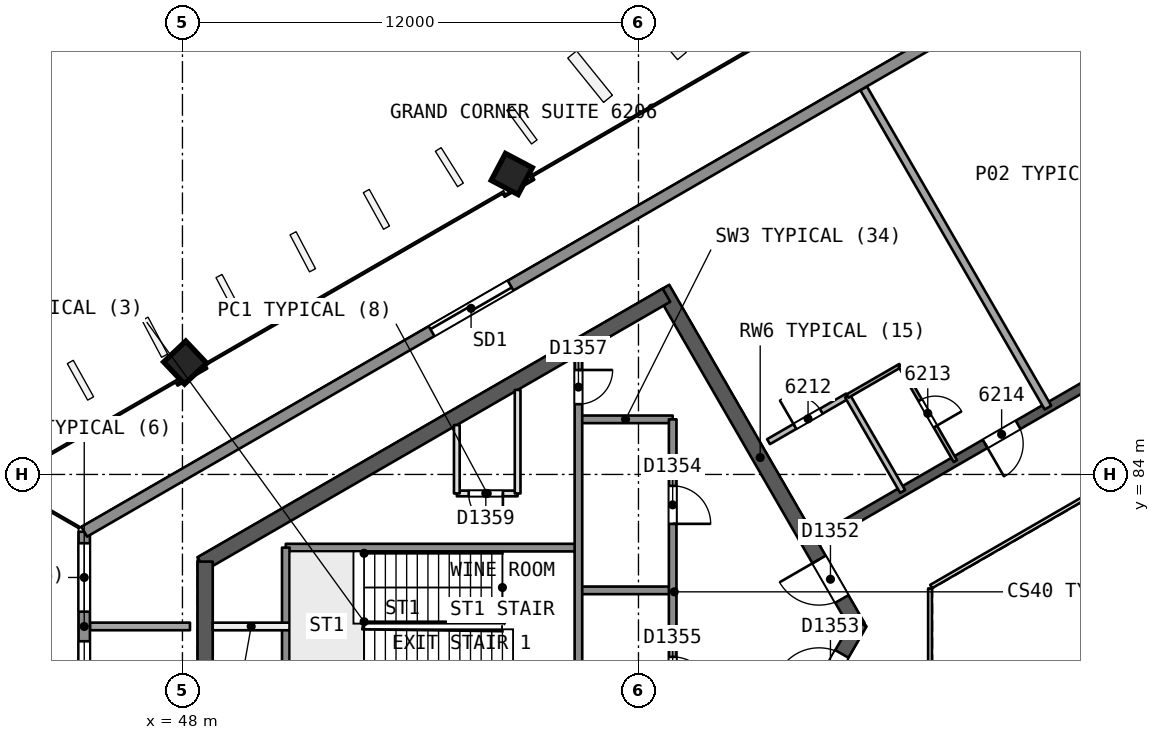
"""IFC4 building model, lengths in metres.
Left out: names, types, materials, properties, quantities, classifications, styles, units other than length and angle.
Written with IfcOpenShell. Run it as: python <this file> out.ifc"""

import sys

from ifc_helpers import new_model, si_unit, direction, frame, frame_2d, origin, origin_2d, place, context, subcontext, project, spatial, rectangle, extrude, element, fill, save


model = new_model("IFC4")
c1 = context("Model", 3, precision=1e-05, world=origin(), true_north=direction((0.0, 1.0)))
c2 = subcontext(c1, "Body", "Model", "MODEL_VIEW")
j1 = project(units=[si_unit("LENGTHUNIT", "METRE"), si_unit("PLANEANGLEUNIT", "RADIAN")], contexts=[c1])
p1 = place(None, origin())
s1 = spatial("IfcSite", under=j1, at=p1, CompositionType="ELEMENT")
p2 = place(p1, origin())
s2 = spatial("IfcBuilding", under=s1, at=p2, CompositionType="ELEMENT")
p3 = place(p2, frame((0.0, 0.0, 255.3)))
s3 = spatial("IfcBuildingStorey", under=s2, at=p3, CompositionType="ELEMENT", Elevation=255.3)
p4 = place(p3, frame((65.769, 80.0, 0.0), z_axis=(0.0, 0.0, 1.0), x_axis=(-0.50000177223, 0.866024380585, 0.0)))
e1 = element("IfcWall", 1, at=p4, inside=s3, PredefinedType="SHEAR", context=c2, shape_type="SweptSolid", body=[
    extrude(rectangle(XDim=10.265, YDim=0.4, at=frame_2d((5.132, 0.0))), origin(), (0.0, 0.0, 1.0), 3.7),
])
p5 = place(p4, frame((0.834, 0.0, 0.0)))
e2 = element("IfcOpeningElement", 2, at=p5, cuts=e1, PredefinedType="OPENING", context=c2, shape_type="SweptSolid", body=[
    extrude(rectangle(XDim=1.2, YDim=2.1, at=frame_2d((0.6, 1.05))), frame((0.0, 0.21, 0.0), z_axis=(0.0, -1.0, 0.0), x_axis=(1.0, 0.0, 0.0)), (0.0, 0.0, 1.0), 0.421),
])
p6 = place(p3, frame((60.737, 88.716, 0.0), z_axis=(0.0, 0.0, 1.0), x_axis=(-0.866028812667, -0.499994095595, 0.0)))
e3 = element("IfcWall", 3, at=p6, inside=s3, PredefinedType="SHEAR", context=c2, shape_type="SweptSolid", body=[
    extrude(rectangle(XDim=14.134, YDim=0.4, at=frame_2d((7.067, 0.0))), origin(), (0.0, 0.0, 1.0), 3.7),
])
p7 = place(p3, frame((48.597, 81.707, 0.0), z_axis=(0.0, 0.0, 1.0), x_axis=(0.0, -1.0, 0.0)))
e4 = element("IfcWall", 4, at=p7, inside=s3, PredefinedType="SHEAR", context=c2, shape_type="SweptSolid", body=[
    extrude(rectangle(XDim=3.53, YDim=0.4, at=frame_2d((1.765, 0.0))), origin(), (0.0, 0.0, 1.0), 3.7),
])
p8 = place(p3, frame((60.737, 71.284, 0.0), z_axis=(0.0, 0.0, 1.0), x_axis=(0.50000547566, 0.866022242388, 0.0)))
e5 = element("IfcWall", 5, at=p8, inside=s3, PredefinedType="SHEAR", context=c2, shape_type="SweptSolid", body=[
    extrude(rectangle(XDim=10.18, YDim=0.4, at=frame_2d((5.09, 0.0))), origin(), (0.0, 0.0, 1.0), 3.7),
])
p9 = place(p8, frame((8.03, 0.0, 0.0)))
e6 = element("IfcOpeningElement", 6, at=p9, cuts=e5, PredefinedType="OPENING", context=c2, shape_type="SweptSolid", body=[
    extrude(rectangle(XDim=1.2, YDim=2.1, at=frame_2d((0.6, 1.05))), frame((0.0, 0.21, 0.0), z_axis=(0.0, -1.0, 0.0), x_axis=(1.0, 0.0, 0.0)), (0.0, 0.0, 1.0), 0.421),
])
p10 = place(p3, frame((78.2, 90.046, 0.0), z_axis=(0.0, 0.0, 1.0), x_axis=(-0.866026492143, -0.499998114903, 0.0)))
e7 = element("IfcWall", 7, at=p10, inside=s3, PredefinedType="SHEAR", context=c2, shape_type="SweptSolid", body=[
    extrude(rectangle(XDim=15.588, YDim=0.25, at=frame_2d((7.794, 0.0))), origin(), (0.0, 0.0, 1.0), 3.3),
])
p11 = place(p10, frame((5.887, 0.0, 0.0)))
e8 = element("IfcOpeningElement", 8, at=p11, cuts=e7, PredefinedType="OPENING", context=c2, shape_type="SweptSolid", body=[
    extrude(rectangle(XDim=1.0, YDim=2.1, at=frame_2d((0.5, 1.05))), frame((0.0, 0.135, 0.0), z_axis=(0.0, -1.0, 0.0), x_axis=(1.0, 0.0, 0.0)), (0.0, 0.0, 1.0), 0.271),
])
p12 = place(p10, frame((9.481, 0.0, 0.0)))
e9 = element("IfcOpeningElement", 9, at=p12, cuts=e7, PredefinedType="OPENING", context=c2, shape_type="SweptSolid", body=[
    extrude(rectangle(XDim=1.0, YDim=2.1, at=frame_2d((0.5, 1.05))), frame((0.0, 0.135, 0.0), z_axis=(0.0, -1.0, 0.0), x_axis=(1.0, 0.0, 0.0)), (0.0, 0.0, 1.0), 0.271),
])
p13 = place(p3, frame((56.643, 91.92, 0.0), z_axis=(0.019328516974, -0.012138044789, 0.999739504221), x_axis=(-0.500205614953, 0.865671455024, 0.020181048691)))
e10 = element("IfcColumn", 10, at=p13, inside=s3, PredefinedType="COLUMN", context=c2, shape_type="SweptSolid", body=[
    extrude(rectangle(XDim=0.8, YDim=0.8, at=origin_2d()), origin(), (0.0, 0.0, 1.0), 3.701),
])
p14 = place(p3, frame((48.037, 86.951, 0.0), z_axis=(0.02855911485, -0.006793507689, 0.999569019734), x_axis=(-0.500407643461, 0.865554709988, 0.020180049142)))
e11 = element("IfcColumn", 11, at=p14, inside=s3, PredefinedType="COLUMN", context=c2, shape_type="SweptSolid", body=[
    extrude(rectangle(XDim=0.8, YDim=0.8, at=origin_2d()), origin(), (0.0, 0.0, 1.0), 3.702),
])
p15 = place(p3, frame((65.924, 94.162, 0.0), z_axis=(0.0, 0.0, 1.0), x_axis=(0.499987464755, -0.86603264089, 0.0)))
e12 = element("IfcWall", 12, at=p15, inside=s3, PredefinedType="PARTITIONING", context=c2, shape_type="SweptSolid", body=[
    extrude(rectangle(XDim=9.702, YDim=0.2, at=frame_2d((4.851, 0.0))), origin(), (0.0, 0.0, 1.0), 3.3),
])
p16 = place(p3, frame((63.422, 84.863, 0.0), z_axis=(0.0, 0.0, 1.0), x_axis=(0.865994240961, 0.500053971709, 0.0)))
e13 = element("IfcWall", 13, at=p16, inside=s3, PredefinedType="PARTITIONING", context=c2, shape_type="SweptSolid", body=[
    extrude(rectangle(XDim=2.401, YDim=0.15, at=frame_2d((1.201, 0.0))), origin(), (0.0, 0.0, 1.0), 3.3),
])
p17 = place(p16, frame((0.801, 0.0, 0.0)))
e14 = element("IfcOpeningElement", 14, at=p17, cuts=e13, PredefinedType="OPENING", context=c2, shape_type="SweptSolid", body=[
    extrude(rectangle(XDim=0.8, YDim=2.1, at=frame_2d((0.4, 1.05))), frame((0.0, 0.085, 0.0), z_axis=(0.0, -1.0, 0.0), x_axis=(1.0, 0.0, 0.0)), (0.0, 0.0, 1.0), 0.171),
])
p18 = place(p3, frame((65.502, 86.063, 0.0), z_axis=(0.0, 0.0, 1.0), x_axis=(0.866055983265, 0.499947031044, 0.0)))
e15 = element("IfcWall", 15, at=p18, inside=s3, PredefinedType="PARTITIONING", context=c2, shape_type="SweptSolid", body=[
    extrude(rectangle(XDim=1.6, YDim=0.1, at=frame_2d((0.8, 0.0))), origin(), (0.0, 0.0, 1.0), 3.3),
])
p19 = place(p3, frame((66.887, 86.863, 0.0), z_axis=(0.0, 0.0, 1.0), x_axis=(0.50005036918, -0.865996321171, 0.0)))
e16 = element("IfcWall", 16, at=p19, inside=s3, PredefinedType="PARTITIONING", context=c2, shape_type="SweptSolid", body=[
    extrude(rectangle(XDim=2.9, YDim=0.1, at=frame_2d((1.45, 0.0))), origin(), (0.0, 0.0, 1.0), 3.3),
])
p20 = place(p19, frame((1.05, 0.0, 0.0)))
e17 = element("IfcOpeningElement", 17, at=p20, cuts=e16, PredefinedType="OPENING", context=c2, shape_type="SweptSolid", body=[
    extrude(rectangle(XDim=0.8, YDim=2.1, at=frame_2d((0.4, 1.05))), frame((0.0, 0.061, 0.0), z_axis=(0.0, -1.0, 0.0), x_axis=(1.0, 0.0, 0.0)), (0.0, 0.0, 1.0), 0.121),
])
p21 = place(p3, frame((45.565, 80.001, 0.0), z_axis=(0.0, 0.0, 1.0), x_axis=(1.0, 0.0, 0.0)))
e18 = element("IfcWall", 18, at=p21, inside=s3, PredefinedType="PARTITIONING", context=c2, shape_type="SweptSolid", body=[
    extrude(rectangle(XDim=2.633, YDim=0.2, at=frame_2d((1.317, 0.0))), origin(), (0.0, 0.0, 1.0), 3.3),
])
p22 = place(p3, frame((66.952, 83.552, 0.0), z_axis=(0.0, 0.0, 1.0), x_axis=(-0.499987231761, 0.866032775405, 0.0)))
e19 = element("IfcWall", 19, at=p22, inside=s3, PredefinedType="PARTITIONING", context=c2, shape_type="SweptSolid", body=[
    extrude(rectangle(XDim=2.9, YDim=0.15, at=frame_2d((1.45, 0.0))), origin(), (0.0, 0.0, 1.0), 3.3),
])
p23 = place(p3, frame((45.416, 77.507, 0.0), z_axis=(0.0, 0.0, 1.0), x_axis=(0.0, 1.0, 0.0)))
e20 = element("IfcWall", 20, at=p23, inside=s3, PredefinedType="SOLIDWALL", context=c2, shape_type="SweptSolid", body=[
    extrude(rectangle(XDim=4.987, YDim=0.3, at=frame_2d((2.493, 0.0))), origin(), (0.0, 0.0, 1.0), 3.3),
])
p24 = place(p23, frame((2.883, 0.0, 0.9)))
e21 = element("IfcOpeningElement", 21, at=p24, cuts=e20, PredefinedType="OPENING", context=c2, shape_type="SweptSolid", body=[
    extrude(rectangle(XDim=1.8, YDim=1.5, at=frame_2d((0.9, 0.75))), frame((0.0, 0.161, 0.0), z_axis=(0.0, -1.0, 0.0), x_axis=(1.0, 0.0, 0.0)), (0.0, 0.0, 1.0), 0.321),
])
p25 = place(p23, frame((0.304, 0.0, 0.9)))
e22 = element("IfcOpeningElement", 22, at=p25, cuts=e20, PredefinedType="OPENING", context=c2, shape_type="SweptSolid", body=[
    extrude(rectangle(XDim=1.8, YDim=1.5, at=frame_2d((0.9, 0.75))), frame((0.0, 0.161, 0.0), z_axis=(0.0, -1.0, 0.0), x_axis=(1.0, 0.0, 0.0)), (0.0, 0.0, 1.0), 0.321),
])
p26 = place(p3, frame((45.416, 82.493, 0.0), z_axis=(0.0, 0.0, 1.0), x_axis=(0.866025373204, 0.500000052967, 0.0)))
e23 = element("IfcWall", 23, at=p26, inside=s3, PredefinedType="SOLIDWALL", context=c2, shape_type="SweptSolid", body=[
    extrude(rectangle(XDim=48.748, YDim=0.3, at=frame_2d((24.374, 0.0))), origin(), (0.0, 0.0, 1.0), 3.3),
])
p27 = place(p26, frame((35.015, 0.0, 0.0)))
e24 = element("IfcOpeningElement", 24, at=p27, cuts=e23, PredefinedType="OPENING", context=c2, shape_type="SweptSolid", body=[
    extrude(rectangle(XDim=2.4, YDim=2.4, at=frame_2d((1.2, 1.2))), frame((0.0, 0.161, 0.0), z_axis=(0.0, -1.0, 0.0), x_axis=(1.0, 0.0, 0.0)), (0.0, 0.0, 1.0), 0.321),
])
p28 = place(p26, frame((10.554, 0.0, 0.0)))
e25 = element("IfcOpeningElement", 25, at=p28, cuts=e23, PredefinedType="OPENING", context=c2, shape_type="SweptSolid", body=[
    extrude(rectangle(XDim=2.4, YDim=2.4, at=frame_2d((1.2, 1.2))), frame((0.0, 0.161, 0.0), z_axis=(0.0, -1.0, 0.0), x_axis=(1.0, 0.0, 0.0)), (0.0, 0.0, 1.0), 0.321),
])
p29 = place(p3, frame((60.9, 85.45, 0.0), z_axis=(0.0, 0.0, 1.0), x_axis=(-1.0, 0.0, 0.0)))
e26 = element("IfcWall", 26, at=p29, inside=s3, PredefinedType="SOLIDWALL", context=c2, shape_type="SweptSolid", body=[
    extrude(rectangle(XDim=2.48, YDim=0.2, at=frame_2d((1.24, 0.0))), origin(), (0.0, 0.0, 1.0), 3.3),
])
p30 = place(p3, frame((56.82, 83.5, 0.0), z_axis=(0.0, 0.0, 1.0), x_axis=(-1.0, 0.0, 0.0)))
e27 = element("IfcWall", 27, at=p30, inside=s3, PredefinedType="PARTITIONING", context=c2, shape_type="SweptSolid", body=[
    extrude(rectangle(XDim=1.6, YDim=0.15, at=frame_2d((0.8, 0.0))), origin(), (0.0, 0.0, 1.0), 3.3),
])
p31 = place(p30, frame((0.387, 0.0, 0.0)))
e28 = element("IfcOpeningElement", 28, at=p31, cuts=e27, PredefinedType="OPENING", context=c2, shape_type="SweptSolid", body=[
    extrude(rectangle(XDim=0.9, YDim=2.1, at=frame_2d((0.45, 1.05))), frame((0.0, 0.085, 0.0), z_axis=(0.0, -1.0, 0.0), x_axis=(1.0, 0.0, 0.0)), (0.0, 0.0, 1.0), 0.171),
])
p32 = place(p3, frame((58.42, 82.075, 0.0), z_axis=(0.0, 0.0, 1.0), x_axis=(-1.0, 0.0, 0.0)))
e29 = element("IfcWall", 29, at=p32, inside=s3, PredefinedType="SOLIDWALL", context=c2, shape_type="SweptSolid", body=[
    extrude(rectangle(XDim=7.7, YDim=0.2, at=frame_2d((3.85, 0.0))), origin(), (0.0, 0.0, 1.0), 3.3),
])
p33 = place(p3, frame((60.9, 80.95, 0.0), z_axis=(0.0, 0.0, 1.0), x_axis=(-1.0, 0.0, 0.0)))
e30 = element("IfcWall", 30, at=p33, inside=s3, PredefinedType="SOLIDWALL", context=c2, shape_type="SweptSolid", body=[
    extrude(rectangle(XDim=2.48, YDim=0.2, at=frame_2d((1.24, 0.0))), origin(), (0.0, 0.0, 1.0), 3.3),
])
p34 = place(p3, frame((50.82, 80.0, 0.0), z_axis=(0.0, 0.0, 1.0), x_axis=(-1.0, 0.0, 0.0)))
e31 = element("IfcWall", 31, at=p34, inside=s3, PredefinedType="PARTITIONING", context=c2, shape_type="SweptSolid", body=[
    extrude(rectangle(XDim=2.023, YDim=0.2, at=frame_2d((1.012, 0.0))), origin(), (0.0, 0.0, 1.0), 3.3),
])
p35 = place(p3, frame((60.9, 85.45, 0.0), z_axis=(0.0, 0.0, 1.0), x_axis=(0.0, -1.0, 0.0)))
e32 = element("IfcWall", 32, at=p35, inside=s3, PredefinedType="SOLIDWALL", context=c2, shape_type="SweptSolid", body=[
    extrude(rectangle(XDim=10.9, YDim=0.2, at=frame_2d((5.45, 0.0))), origin(), (0.0, 0.0, 1.0), 3.3),
])
p36 = place(p35, frame((1.75, 0.0, 0.0)))
e33 = element("IfcOpeningElement", 33, at=p36, cuts=e32, PredefinedType="OPENING", context=c2, shape_type="SweptSolid", body=[
    extrude(rectangle(XDim=1.0, YDim=2.1, at=frame_2d((0.5, 1.05))), frame((0.0, 0.11, 0.0), z_axis=(0.0, -1.0, 0.0), x_axis=(1.0, 0.0, 0.0)), (0.0, 0.0, 1.0), 0.221),
])
p37 = place(p35, frame((6.25, 0.0, 0.0)))
e34 = element("IfcOpeningElement", 34, at=p37, cuts=e32, PredefinedType="OPENING", context=c2, shape_type="SweptSolid", body=[
    extrude(rectangle(XDim=1.0, YDim=2.1, at=frame_2d((0.5, 1.05))), frame((0.0, 0.11, 0.0), z_axis=(0.0, -1.0, 0.0), x_axis=(1.0, 0.0, 0.0)), (0.0, 0.0, 1.0), 0.221),
])
p38 = place(p3, frame((58.42, 87.148, 0.0), z_axis=(0.0, 0.0, 1.0), x_axis=(0.0, -1.0, 0.0)))
e35 = element("IfcWall", 35, at=p38, inside=s3, PredefinedType="SOLIDWALL", context=c2, shape_type="SweptSolid", body=[
    extrude(rectangle(XDim=10.698, YDim=0.2, at=frame_2d((5.349, 0.0))), origin(), (0.0, 0.0, 1.0), 3.3),
])
p39 = place(p38, frame((0.399, 0.0, 0.0)))
e36 = element("IfcOpeningElement", 36, at=p39, cuts=e35, PredefinedType="OPENING", context=c2, shape_type="SweptSolid", body=[
    extrude(rectangle(XDim=0.9, YDim=2.1, at=frame_2d((0.45, 1.05))), frame((0.0, 0.11, 0.0), z_axis=(0.0, -1.0, 0.0), x_axis=(1.0, 0.0, 0.0)), (0.0, 0.0, 1.0), 0.221),
])
p40 = place(p3, frame((56.82, 86.224, 0.0), z_axis=(0.0, 0.0, 1.0), x_axis=(0.0, -1.0, 0.0)))
e37 = element("IfcWall", 37, at=p40, inside=s3, PredefinedType="PARTITIONING", context=c2, shape_type="SweptSolid", body=[
    extrude(rectangle(XDim=2.724, YDim=0.15, at=frame_2d((1.362, 0.0))), origin(), (0.0, 0.0, 1.0), 3.3),
])
p41 = place(p3, frame((55.22, 85.3, 0.0), z_axis=(0.0, 0.0, 1.0), x_axis=(0.0, -1.0, 0.0)))
e38 = element("IfcWall", 38, at=p41, inside=s3, PredefinedType="PARTITIONING", context=c2, shape_type="SweptSolid", body=[
    extrude(rectangle(XDim=1.8, YDim=0.15, at=frame_2d((0.9, 0.0))), origin(), (0.0, 0.0, 1.0), 3.3),
])
p42 = place(p3, frame((50.72, 82.075, 0.0), z_axis=(0.0, 0.0, 1.0), x_axis=(0.0, -1.0, 0.0)))
e39 = element("IfcWall", 39, at=p42, inside=s3, PredefinedType="SOLIDWALL", context=c2, shape_type="SweptSolid", body=[
    extrude(rectangle(XDim=4.15, YDim=0.2, at=frame_2d((2.075, 0.0))), origin(), (0.0, 0.0, 1.0), 3.3),
])
p43 = place(p3, frame((77.738, 86.846, 0.0), z_axis=(0.0, 0.0, 1.0), x_axis=(-0.866026658274, -0.499997827154, 0.0)))
e40 = element("IfcWall", 40, at=p43, inside=s3, PredefinedType="PARTITIONING", context=c2, shape_type="SweptSolid", body=[
    extrude(rectangle(XDim=11.588, YDim=0.1, at=frame_2d((5.794, 0.0))), origin(), (0.0, 0.0, 1.0), 3.3),
])
p44 = place(p3, frame((67.672, 81.0, 0.0), z_axis=(0.0, 0.0, 1.0), x_axis=(0.0, -1.0, 0.0)))
e41 = element("IfcWall", 41, at=p44, inside=s3, PredefinedType="PARTITIONING", context=c2, shape_type="SweptSolid", body=[
    extrude(rectangle(XDim=2.0, YDim=0.1, at=frame_2d((1.0, 0.0))), origin(), (0.0, 0.0, 1.0), 3.3),
])
p45 = place(p17, origin())
e42 = element("IfcDoor", 42, at=p45, inside=s3, OperationType="SINGLE_SWING_LEFT", PredefinedType="NOTDEFINED", context=c2, shape_type="SweptSolid", body=[
    extrude(rectangle(XDim=0.8, YDim=2.1, at=frame_2d((0.4, 1.05))), frame((0.0, 0.025, 0.0), z_axis=(0.0, -1.0, 0.0), x_axis=(1.0, 0.0, 0.0)), (0.0, 0.0, 1.0), 0.05),
])
fill(e14, e42)
p46 = place(p20, origin())
e43 = element("IfcDoor", 43, at=p46, inside=s3, OperationType="SINGLE_SWING_RIGHT", PredefinedType="NOTDEFINED", context=c2, shape_type="SweptSolid", body=[
    extrude(rectangle(XDim=0.8, YDim=2.1, at=frame_2d((0.4, 1.05))), frame((0.0, 0.025, 0.0), z_axis=(0.0, -1.0, 0.0), x_axis=(1.0, 0.0, 0.0)), (0.0, 0.0, 1.0), 0.05),
])
fill(e17, e43)
p47 = place(p12, origin())
e44 = element("IfcDoor", 44, at=p47, inside=s3, OperationType="SINGLE_SWING_RIGHT", PredefinedType="NOTDEFINED", context=c2, shape_type="SweptSolid", body=[
    extrude(rectangle(XDim=1.0, YDim=2.1, at=frame_2d((0.5, 1.05))), frame((0.0, 0.025, 0.0), z_axis=(0.0, -1.0, 0.0), x_axis=(1.0, 0.0, 0.0)), (0.0, 0.0, 1.0), 0.05),
])
fill(e9, e44)
p48 = place(p24, origin())
e45 = element("IfcWindow", 45, at=p48, inside=s3, PartitioningType="SINGLE_PANEL", PredefinedType="WINDOW", context=c2, shape_type="SweptSolid", body=[
    extrude(rectangle(XDim=1.8, YDim=1.5, at=frame_2d((0.9, 0.75))), frame((0.0, 0.03, 0.0), z_axis=(0.0, -1.0, 0.0), x_axis=(1.0, 0.0, 0.0)), (0.0, 0.0, 1.0), 0.06),
])
fill(e21, e45)
p49 = place(p25, origin())
e46 = element("IfcWindow", 46, at=p49, inside=s3, PartitioningType="SINGLE_PANEL", PredefinedType="WINDOW", context=c2, shape_type="SweptSolid", body=[
    extrude(rectangle(XDim=1.8, YDim=1.5, at=frame_2d((0.9, 0.75))), frame((0.0, 0.03, 0.0), z_axis=(0.0, -1.0, 0.0), x_axis=(1.0, 0.0, 0.0)), (0.0, 0.0, 1.0), 0.06),
])
fill(e22, e46)
p50 = place(p28, origin())
e47 = element("IfcDoor", 47, at=p50, inside=s3, OperationType="SLIDING_TO_RIGHT", PredefinedType="NOTDEFINED", context=c2, shape_type="SweptSolid", body=[
    extrude(rectangle(XDim=2.4, YDim=2.4, at=frame_2d((1.2, 1.2))), frame((0.0, 0.025, 0.0), z_axis=(0.0, -1.0, 0.0), x_axis=(1.0, 0.0, 0.0)), (0.0, 0.0, 1.0), 0.05),
])
fill(e25, e47)
p51 = place(p5, origin())
e48 = element("IfcDoor", 48, at=p51, inside=s3, OperationType="SINGLE_SWING_RIGHT", PredefinedType="NOTDEFINED", context=c2, shape_type="SweptSolid", body=[
    extrude(rectangle(XDim=1.2, YDim=2.1, at=frame_2d((0.6, 1.05))), frame((0.0, 0.025, 0.0), z_axis=(0.0, -1.0, 0.0), x_axis=(1.0, 0.0, 0.0)), (0.0, 0.0, 1.0), 0.05),
])
fill(e2, e48)
p52 = place(p9, origin())
e49 = element("IfcDoor", 49, at=p52, inside=s3, OperationType="SINGLE_SWING_LEFT", PredefinedType="NOTDEFINED", context=c2, shape_type="SweptSolid", body=[
    extrude(rectangle(XDim=1.2, YDim=2.1, at=frame_2d((0.6, 1.05))), frame((0.0, 0.025, 0.0), z_axis=(0.0, -1.0, 0.0), x_axis=(1.0, 0.0, 0.0)), (0.0, 0.0, 1.0), 0.05),
])
fill(e6, e49)
p53 = place(p36, origin())
e50 = element("IfcDoor", 50, at=p53, inside=s3, OperationType="SINGLE_SWING_RIGHT", PredefinedType="NOTDEFINED", context=c2, shape_type="SweptSolid", body=[
    extrude(rectangle(XDim=1.0, YDim=2.1, at=frame_2d((0.5, 1.05))), frame((0.0, 0.025, 0.0), z_axis=(0.0, -1.0, 0.0), x_axis=(1.0, 0.0, 0.0)), (0.0, 0.0, 1.0), 0.05),
])
fill(e33, e50)
p54 = place(p37, origin())
e51 = element("IfcDoor", 51, at=p54, inside=s3, OperationType="SINGLE_SWING_RIGHT", PredefinedType="NOTDEFINED", context=c2, shape_type="SweptSolid", body=[
    extrude(rectangle(XDim=1.0, YDim=2.1, at=frame_2d((0.5, 1.05))), frame((0.0, 0.025, 0.0), z_axis=(0.0, -1.0, 0.0), x_axis=(1.0, 0.0, 0.0)), (0.0, 0.0, 1.0), 0.05),
])
fill(e34, e51)
p55 = place(p39, origin())
e52 = element("IfcDoor", 52, at=p55, inside=s3, OperationType="SINGLE_SWING_LEFT", PredefinedType="NOTDEFINED", context=c2, shape_type="SweptSolid", body=[
    extrude(rectangle(XDim=0.9, YDim=2.1, at=frame_2d((0.45, 1.05))), frame((0.0, 0.025, 0.0), z_axis=(0.0, -1.0, 0.0), x_axis=(1.0, 0.0, 0.0)), (0.0, 0.0, 1.0), 0.05),
])
fill(e36, e52)
p56 = place(p31, origin())
e53 = element("IfcDoor", 53, at=p56, inside=s3, OperationType="SINGLE_SWING_LEFT", PredefinedType="NOTDEFINED", context=c2, shape_type="SweptSolid", body=[
    extrude(rectangle(XDim=0.9, YDim=2.1, at=frame_2d((0.45, 1.05))), frame((0.0, 0.025, 0.0), z_axis=(0.0, -1.0, 0.0), x_axis=(1.0, 0.0, 0.0)), (0.0, 0.0, 1.0), 0.05),
])
fill(e28, e53)
save(model, sys.argv[1])
